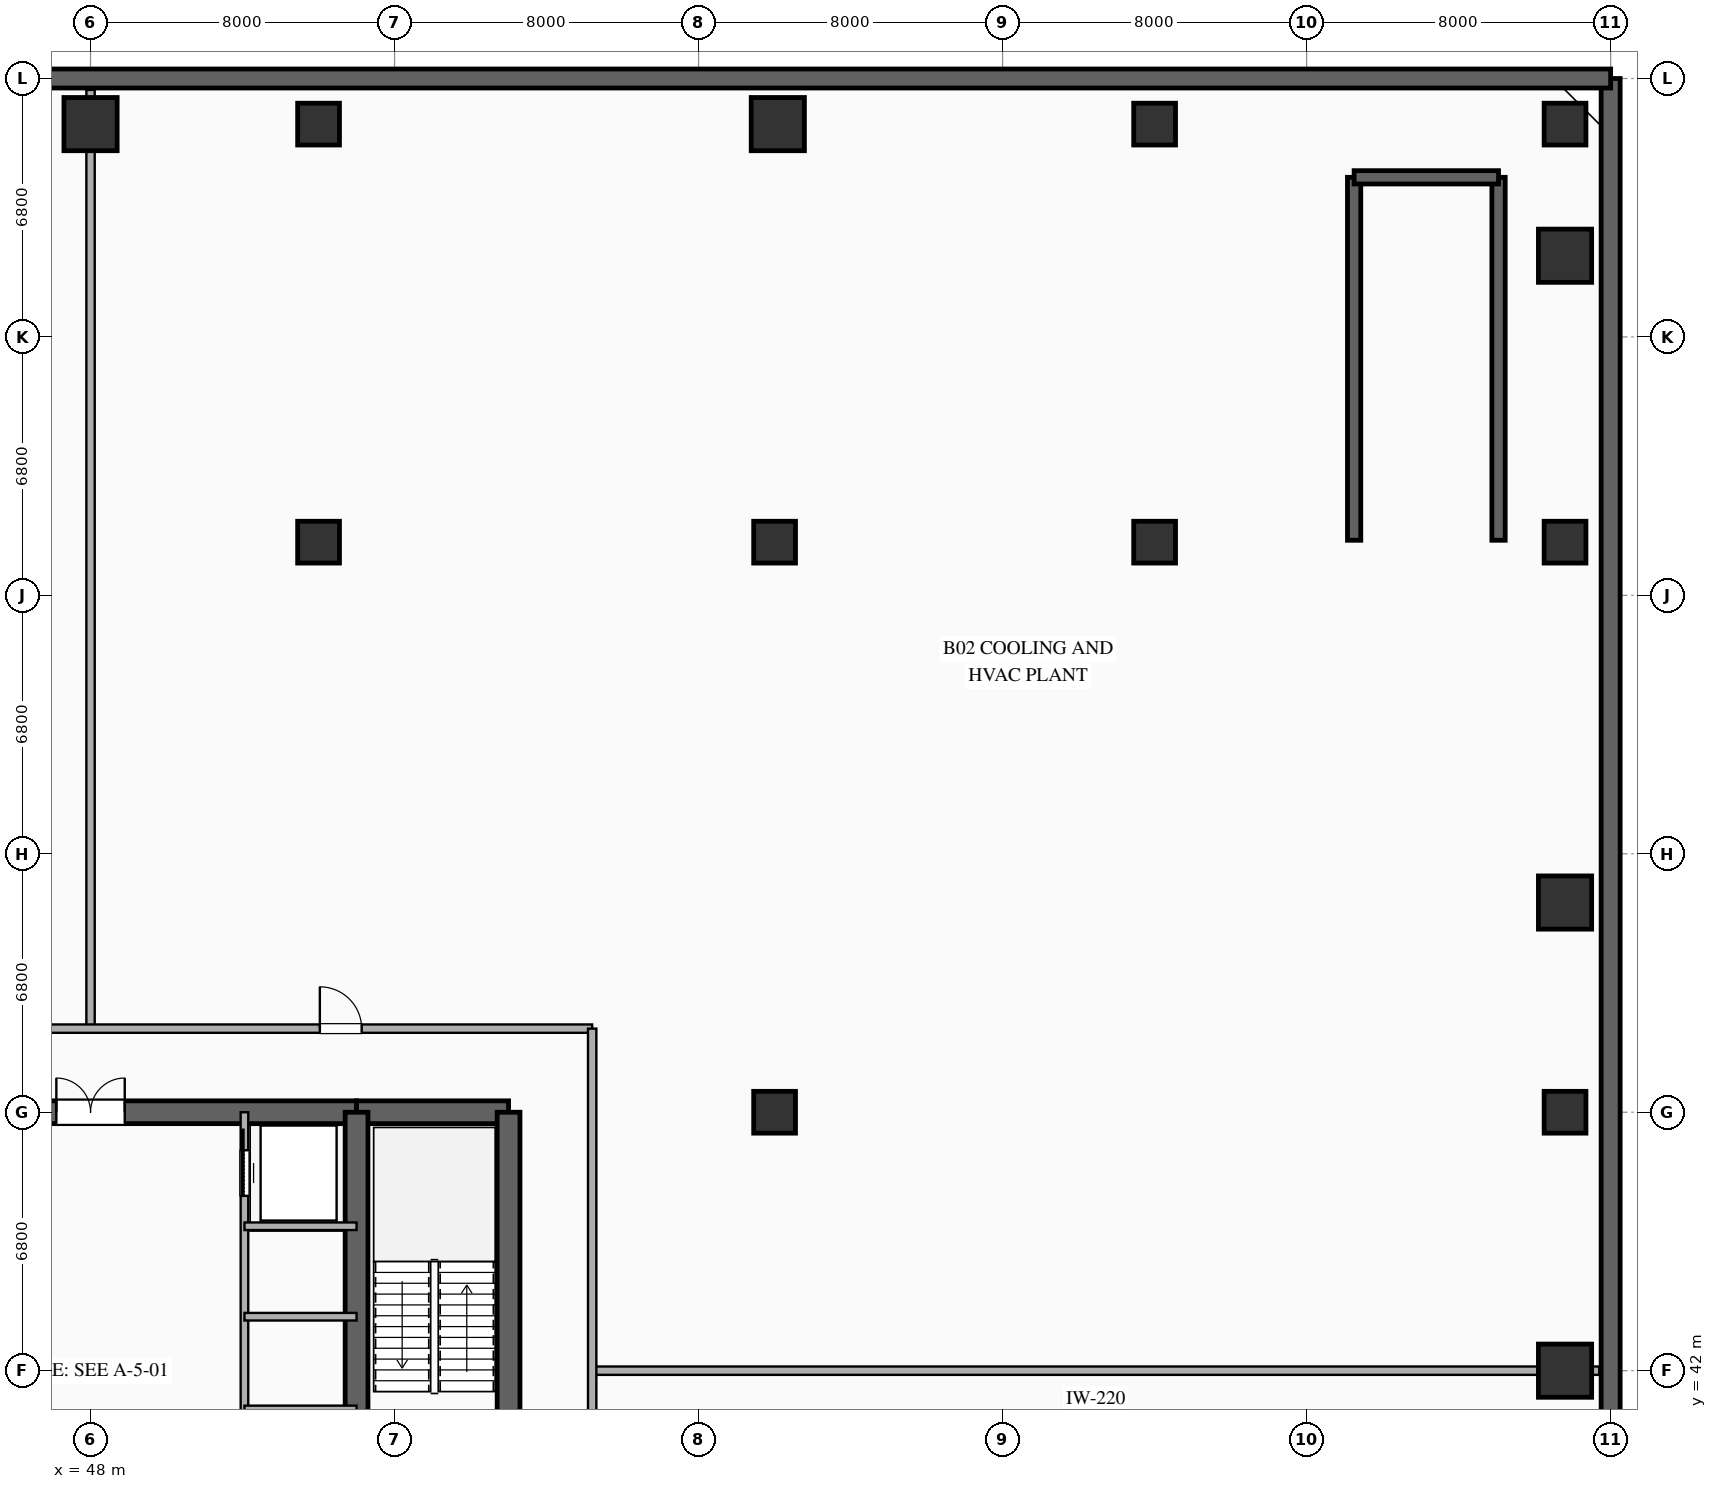
"""IFC4 building model, lengths in metres.
Left out: names, types, materials, properties, quantities, classifications, styles, units other than length and angle.
Written with IfcOpenShell. Run it as: python <this file> out.ifc"""

import sys

from ifc_helpers import new_model, si_unit, direction, frame, frame_2d, origin, origin_2d, place, context, subcontext, project, spatial, rectangle, extrude, element, fill, save


model = new_model("IFC4")
c1 = context("Model", 3, precision=1e-05, world=origin(), true_north=direction((0.0, 1.0)))
c2 = subcontext(c1, "Body", "Model", "MODEL_VIEW")
j1 = project(units=[si_unit("LENGTHUNIT", "METRE"), si_unit("PLANEANGLEUNIT", "RADIAN")], contexts=[c1])
p1 = place(None, origin())
s1 = spatial("IfcSite", under=j1, at=p1, CompositionType="ELEMENT")
p2 = place(p1, origin())
s2 = spatial("IfcBuilding", under=s1, at=p2, CompositionType="ELEMENT")
p3 = place(p2, frame((0.0, 0.0, -9.0)))
s3 = spatial("IfcBuildingStorey", under=s2, at=p3, CompositionType="ELEMENT", Elevation=-9.0)
p4 = place(p3, frame((88.0, 8.0, 0.0), z_axis=(0.0, 0.0, 1.0), x_axis=(0.0, 1.0, 0.0)))
e1 = element("IfcWall", 1, at=p4, inside=s3, PredefinedType="SOLIDWALL", context=c2, shape_type="SweptSolid", body=[
    extrude(rectangle(XDim=68.0, YDim=0.5, at=frame_2d((34.0, 0.0))), origin(), (0.0, 0.0, 1.0), 4.18),
])
p5 = place(p3, frame((88.0, 76.0, 0.0), z_axis=(0.0, 0.0, 1.0), x_axis=(-1.0, 0.0, 0.0)))
e2 = element("IfcWall", 2, at=p5, inside=s3, PredefinedType="SOLIDWALL", context=c2, shape_type="SweptSolid", body=[
    extrude(rectangle(XDim=80.0, YDim=0.5, at=frame_2d((40.0, 0.0))), origin(), (0.0, 0.0, 1.0), 4.18),
])
p6 = place(p3, frame((41.0, 48.8, 0.0), z_axis=(0.0, 0.0, 1.0), x_axis=(1.0, 0.0, 0.0)))
e3 = element("IfcWall", 3, at=p6, inside=s3, PredefinedType="SHEAR", context=c2, shape_type="SweptSolid", body=[
    extrude(rectangle(XDim=14.0, YDim=0.6, at=frame_2d((7.0, 0.0))), origin(), (0.0, 0.0, 1.0), 4.18),
])
p7 = place(p6, frame((6.1, 0.0, 0.0)))
e4 = element("IfcOpeningElement", 4, at=p7, cuts=e3, PredefinedType="OPENING", context=c2, shape_type="SweptSolid", body=[
    extrude(rectangle(XDim=1.8, YDim=2.25, at=frame_2d((0.9, 1.125))), frame((0.0, 0.31, 0.0), z_axis=(0.0, -1.0, 0.0), x_axis=(1.0, 0.0, 0.0)), (0.0, 0.0, 1.0), 0.62),
])
p8 = place(p3, frame((55.0, 48.8, 0.0), z_axis=(0.0, 0.0, 1.0), x_axis=(1.0, 0.0, 0.0)))
e5 = element("IfcWall", 5, at=p8, inside=s3, PredefinedType="SHEAR", context=c2, shape_type="SweptSolid", body=[
    extrude(rectangle(XDim=4.0, YDim=0.6, at=frame_2d((2.0, 0.0))), origin(), (0.0, 0.0, 1.0), 4.18),
])
p9 = place(p3, frame((59.0, 35.2, 0.0), z_axis=(0.0, 0.0, 1.0), x_axis=(0.0, 1.0, 0.0)))
e6 = element("IfcWall", 6, at=p9, inside=s3, PredefinedType="SHEAR", context=c2, shape_type="SweptSolid", body=[
    extrude(rectangle(XDim=13.6, YDim=0.6, at=frame_2d((6.8, 0.0))), origin(), (0.0, 0.0, 1.0), 4.18),
])
p10 = place(p9, frame((1.5, 0.0, 0.0)))
e7 = element("IfcOpeningElement", 7, at=p10, cuts=e6, PredefinedType="OPENING", context=c2, shape_type="SweptSolid", body=[
    extrude(rectangle(XDim=1.2, YDim=2.15, at=frame_2d((0.6, 1.075))), frame((0.0, 0.31, 0.0), z_axis=(0.0, -1.0, 0.0), x_axis=(1.0, 0.0, 0.0)), (0.0, 0.0, 1.0), 0.62),
])
p11 = place(p3, frame((55.0, 35.2, 0.0), z_axis=(0.0, 0.0, 1.0), x_axis=(0.0, 1.0, 0.0)))
e8 = element("IfcWall", 8, at=p11, inside=s3, PredefinedType="SHEAR", context=c2, shape_type="SweptSolid", body=[
    extrude(rectangle(XDim=13.6, YDim=0.6, at=frame_2d((6.8, 0.0))), origin(), (0.0, 0.0, 1.0), 4.18),
])
p12 = place(p11, frame((1.15, 0.0, 0.0)))
e9 = element("IfcOpeningElement", 9, at=p12, cuts=e8, PredefinedType="OPENING", context=c2, shape_type="SweptSolid", body=[
    extrude(rectangle(XDim=1.1, YDim=2.2, at=frame_2d((0.55, 1.1))), frame((0.0, 0.31, 0.0), z_axis=(0.0, -1.0, 0.0), x_axis=(1.0, 0.0, 0.0)), (0.0, 0.0, 1.0), 0.62),
])
for number, where, z_axis, x_axis in (
    (10, (54.0, 74.8, 0.0), (0.0, 0.0, 1.0), (1.0, 0.0, 0.0)),
    (11, (54.0, 63.8, 0.0), (0.0, 0.0, 1.0), (1.0, 0.0, 0.0)),
    (12, (66.0, 63.8, 0.0), (0.0, 0.0, 1.0), (1.0, 0.0, 0.0)),
    (13, (76.0, 74.8, 0.0), (0.0, 0.0, 1.0), (1.0, 0.0, 0.0)),
    (14, (76.0, 63.8, 0.0), (0.0, 0.0, 1.0), (1.0, 0.0, 0.0)),
    (15, (86.8, 74.8, 0.0), (0.0, 0.0, 1.0), (1.0, 0.0, 0.0)),
    (16, (86.8, 63.8, 0.0), (0.0, 0.0, 1.0), (1.0, 0.0, 0.0)),
    (17, (86.8, 48.8, 0.0), (0.0, 0.0, 1.0), (1.0, 0.0, 0.0)),
    (18, (66.0, 48.8, 0.0), (0.0, 0.0, 1.0), (1.0, 0.0, 0.0)),
):
    element("IfcColumn", number, at=place(p3, frame(where, z_axis=z_axis, x_axis=x_axis)), inside=s3, PredefinedType="COLUMN", context=c2, shape_type="SweptSolid", body=[
        extrude(rectangle(XDim=1.1, YDim=1.1, at=origin_2d()), origin(), (0.0, 0.0, 1.0), 4.18),
    ])
for number, where, z_axis, x_axis in (
    (19, (86.8, 42.0, 0.0), (0.0, 0.0, 1.0), (1.0, 0.0, 0.0)),
    (20, (86.8, 54.318, 0.0), (0.0, 0.0, 1.0), (1.0, 0.0, 0.0)),
    (21, (86.8, 71.337, 0.0), (0.0, 0.0, 1.0), (1.0, 0.0, 0.0)),
    (22, (66.084, 74.8, 0.0), (0.0, 0.0, 1.0), (1.0, 0.0, 0.0)),
    (23, (48.0, 74.8, 0.0), (0.0, 0.0, 1.0), (1.0, 0.0, 0.0)),
):
    element("IfcColumn", number, at=place(p3, frame(where, z_axis=z_axis, x_axis=x_axis)), inside=s3, PredefinedType="COLUMN", context=c2, shape_type="SweptSolid", body=[
        extrude(rectangle(XDim=1.4, YDim=1.4, at=origin_2d()), origin(), (0.0, 0.0, 1.0), 4.18),
    ])
for number, where, z_axis, x_axis in (
    (24, (81.25, 63.85, 0.0), (0.0, 0.0, 1.0), (0.0, 1.0, 0.0)),
    (25, (85.05, 63.85, 0.0), (0.0, 0.0, 1.0), (0.0, 1.0, 0.0)),
):
    element("IfcWall", number, at=place(p3, frame(where, z_axis=z_axis, x_axis=x_axis)), inside=s3, PredefinedType="SHEAR", context=c2, shape_type="SweptSolid", body=[
        extrude(rectangle(XDim=9.55, YDim=0.35, at=frame_2d((4.775, 0.0))), origin(), (0.0, 0.0, 1.0), 4.18),
    ])
p13 = place(p3, frame((81.25, 73.4, 0.0), z_axis=(0.0, 0.0, 1.0), x_axis=(1.0, 0.0, 0.0)))
e26 = element("IfcWall", 26, at=p13, inside=s3, PredefinedType="SHEAR", context=c2, shape_type="SweptSolid", body=[
    extrude(rectangle(XDim=3.8, YDim=0.35, at=frame_2d((1.9, 0.0))), origin(), (0.0, 0.0, 1.0), 4.18),
])
p14 = place(p3, frame((52.05, 38.4, 0.0), z_axis=(0.0, 0.0, 1.0), x_axis=(0.0, 1.0, 0.0)))
e27 = element("IfcWall", 27, at=p14, inside=s3, PredefinedType="SOLIDWALL", context=c2, shape_type="SweptSolid", body=[
    extrude(rectangle(XDim=10.4, YDim=0.2, at=frame_2d((5.2, 0.0))), origin(), (0.0, 0.0, 1.0), 3.38),
])
p15 = place(p14, frame((8.2, 0.0, 0.0)))
e28 = element("IfcOpeningElement", 28, at=p15, cuts=e27, PredefinedType="OPENING", context=c2, shape_type="SweptSolid", body=[
    extrude(rectangle(XDim=1.2, YDim=2.2, at=frame_2d((0.6, 1.1))), frame((0.0, 0.11, 0.0), z_axis=(0.0, -1.0, 0.0), x_axis=(1.0, 0.0, 0.0)), (0.0, 0.0, 1.0), 0.22),
])
for number, where, z_axis, x_axis in (
    (29, (52.05, 40.98, 0.0), (0.0, 0.0, 1.0), (1.0, 0.0, 0.0)),
    (30, (52.05, 43.42, 0.0), (0.0, 0.0, 1.0), (1.0, 0.0, 0.0)),
    (31, (52.05, 45.8, 0.0), (0.0, 0.0, 1.0), (1.0, 0.0, 0.0)),
):
    element("IfcWall", number, at=place(p3, frame(where, z_axis=z_axis, x_axis=x_axis)), inside=s3, PredefinedType="SOLIDWALL", context=c2, shape_type="SweptSolid", body=[
        extrude(rectangle(XDim=2.95, YDim=0.2, at=frame_2d((1.475, 0.0))), origin(), (0.0, 0.0, 1.0), 3.38),
    ])
p16 = place(p3, frame((87.7, 42.0, 0.0), z_axis=(0.0, 0.0, 1.0), x_axis=(-1.0, 0.0, 0.0)))
e32 = element("IfcWall", 32, at=p16, inside=s3, PredefinedType="SOLIDWALL", context=c2, shape_type="SweptSolid", body=[
    extrude(rectangle(XDim=26.5, YDim=0.22, at=frame_2d((13.25, 0.0))), origin(), (0.0, 0.0, 1.0), 3.38),
])
p17 = place(p3, frame((48.0, 51.0, 0.0), z_axis=(0.0, 0.0, 1.0), x_axis=(0.0, 1.0, 0.0)))
e33 = element("IfcWall", 33, at=p17, inside=s3, PredefinedType="SOLIDWALL", context=c2, shape_type="SweptSolid", body=[
    extrude(rectangle(XDim=24.7, YDim=0.22, at=frame_2d((12.35, 0.0))), origin(), (0.0, 0.0, 1.0), 3.38),
])
p18 = place(p3, frame((34.8, 51.0, 0.0), z_axis=(0.0, 0.0, 1.0), x_axis=(1.0, 0.0, 0.0)))
e34 = element("IfcWall", 34, at=p18, inside=s3, PredefinedType="SOLIDWALL", context=c2, shape_type="SweptSolid", body=[
    extrude(rectangle(XDim=26.4, YDim=0.22, at=frame_2d((13.2, 0.0))), origin(), (0.0, 0.0, 1.0), 3.38),
])
p19 = place(p18, frame((19.234, 0.0, 0.0)))
e35 = element("IfcOpeningElement", 35, at=p19, cuts=e34, PredefinedType="OPENING", context=c2, shape_type="SweptSolid", body=[
    extrude(rectangle(XDim=1.1, YDim=2.15, at=frame_2d((0.55, 1.075))), frame((0.0, 0.12, 0.0), z_axis=(0.0, -1.0, 0.0), x_axis=(1.0, 0.0, 0.0)), (0.0, 0.0, 1.0), 0.24),
])
p20 = place(p18, frame((6.066, 0.0, 0.0)))
e36 = element("IfcOpeningElement", 36, at=p20, cuts=e34, PredefinedType="OPENING", context=c2, shape_type="SweptSolid", body=[
    extrude(rectangle(XDim=1.1, YDim=2.15, at=frame_2d((0.55, 1.075))), frame((0.0, 0.12, 0.0), z_axis=(0.0, -1.0, 0.0), x_axis=(1.0, 0.0, 0.0)), (0.0, 0.0, 1.0), 0.24),
])
p21 = place(p3, frame((61.2, 51.0, 0.0), z_axis=(0.0, 0.0, 1.0), x_axis=(0.0, -1.0, 0.0)))
e37 = element("IfcWall", 37, at=p21, inside=s3, PredefinedType="SOLIDWALL", context=c2, shape_type="SweptSolid", body=[
    extrude(rectangle(XDim=18.0, YDim=0.22, at=frame_2d((9.0, 0.0))), origin(), (0.0, 0.0, 1.0), 3.38),
])
p22 = place(p7, origin())
e38 = element("IfcDoor", 38, at=p22, inside=s3, OperationType="DOUBLE_DOOR_SINGLE_SWING", PredefinedType="DOOR", context=c2, shape_type="SweptSolid", body=[
    extrude(rectangle(XDim=1.8, YDim=2.25, at=frame_2d((0.9, 1.125))), frame((0.0, 0.025, 0.0), z_axis=(0.0, -1.0, 0.0), x_axis=(1.0, 0.0, 0.0)), (0.0, 0.0, 1.0), 0.05),
])
fill(e4, e38)
p23 = place(p15, origin())
e39 = element("IfcDoor", 39, at=p23, inside=s3, OperationType="SLIDING_TO_RIGHT", PredefinedType="DOOR", context=c2, shape_type="SweptSolid", body=[
    extrude(rectangle(XDim=1.2, YDim=2.2, at=frame_2d((0.6, 1.1))), frame((0.0, 0.025, 0.0), z_axis=(0.0, -1.0, 0.0), x_axis=(1.0, 0.0, 0.0)), (0.0, 0.0, 1.0), 0.05),
])
fill(e28, e39)
p24 = place(p19, origin())
e40 = element("IfcDoor", 40, at=p24, inside=s3, OperationType="SINGLE_SWING_LEFT", PredefinedType="DOOR", context=c2, shape_type="SweptSolid", body=[
    extrude(rectangle(XDim=1.1, YDim=2.15, at=frame_2d((0.55, 1.075))), frame((0.0, 0.025, 0.0), z_axis=(0.0, -1.0, 0.0), x_axis=(1.0, 0.0, 0.0)), (0.0, 0.0, 1.0), 0.05),
])
fill(e35, e40)
save(model, sys.argv[1])
